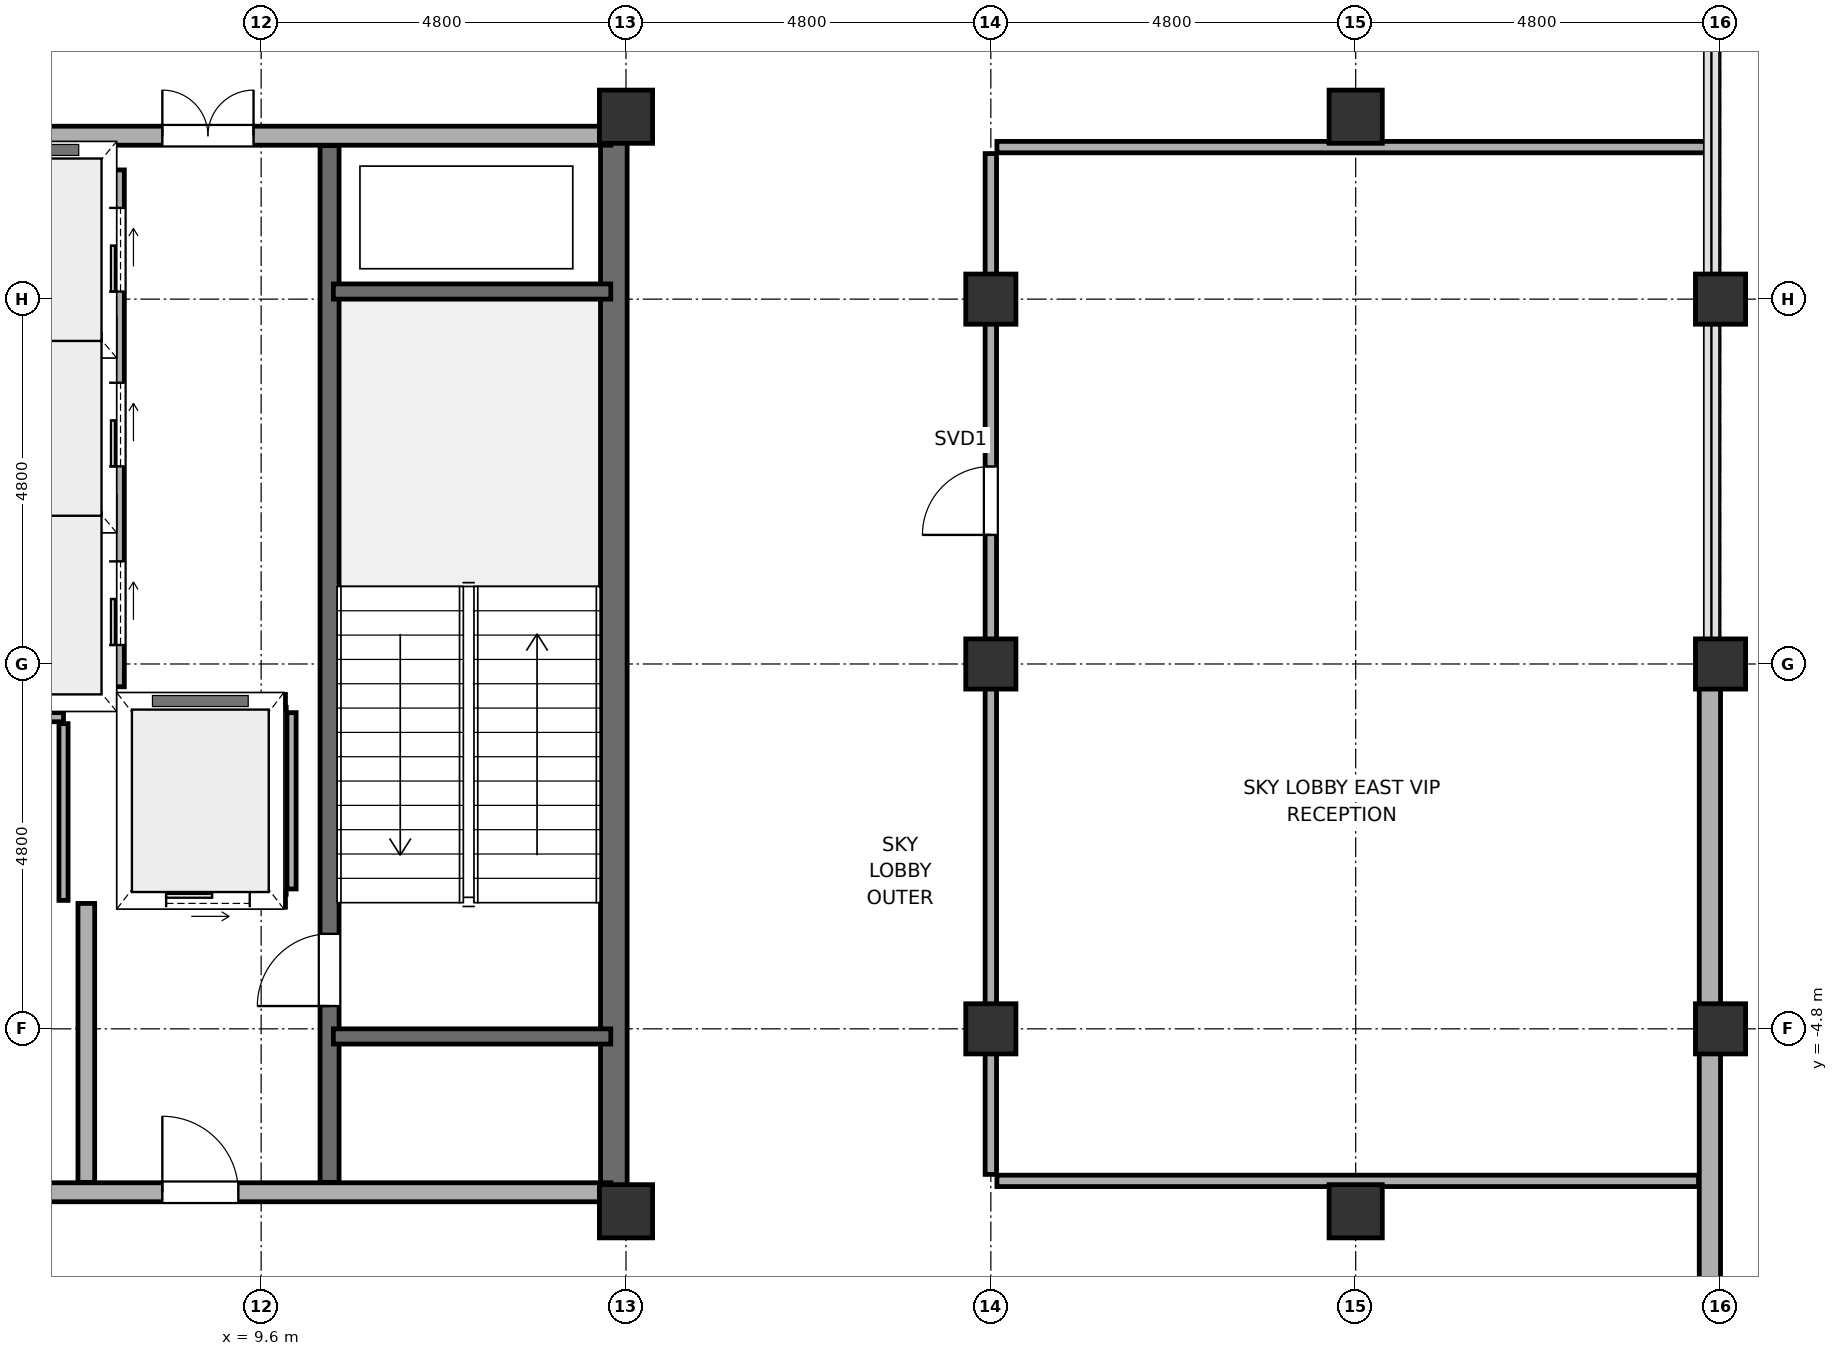
"""IFC4 building model, lengths in metres.
Left out: names, types, materials, properties, quantities, classifications, styles, units other than length and angle.
Written with IfcOpenShell. Run it as: python <this file> out.ifc"""

import sys

from ifc_helpers import new_model, si_unit, direction, frame, frame_2d, origin, origin_2d, place, context, subcontext, project, spatial, rectangle, hollow_rectangle, hollow_circle, extrude, element, fill, save


model = new_model("IFC4")
c1 = context("Model", 3, precision=1e-05, world=origin(), true_north=direction((0.0, 1.0)))
c2 = subcontext(c1, "Body", "Model", "MODEL_VIEW")
j1 = project(units=[si_unit("LENGTHUNIT", "METRE"), si_unit("PLANEANGLEUNIT", "RADIAN")], contexts=[c1])
p1 = place(None, origin())
s1 = spatial("IfcSite", under=j1, at=p1, CompositionType="ELEMENT")
p2 = place(p1, origin())
s2 = spatial("IfcBuilding", under=s1, at=p2, CompositionType="ELEMENT")
p3 = place(p2, frame((0.0, 0.0, 180.3)))
s3 = spatial("IfcBuildingStorey", under=s2, at=p3, CompositionType="ELEMENT", Elevation=180.3)
for number, where, z_axis, x_axis in (
    (1, (14.4, -7.2, 0.0), (0.0, 0.0, 1.0), (1.0, 0.0, 0.0)),
    (2, (14.4, 7.2, 0.0), (0.0, 0.0, 1.0), (1.0, 0.0, 0.0)),
):
    element("IfcColumn", number, at=place(p3, frame(where, z_axis=z_axis, x_axis=x_axis)), inside=s3, PredefinedType="COLUMN", context=c2, shape_type="SweptSolid", body=[
        extrude(hollow_rectangle(XDim=0.7, YDim=0.7, WallThickness=0.032, at=origin_2d()), origin(), (0.0, 0.0, 1.0), 5.2),
    ])
for number, where, z_axis, x_axis in (
    (3, (19.2, -4.8, 0.0), (0.0, 0.0, 1.0), (1.0, 0.0, 0.0)),
    (4, (19.2, 0.0, 0.0), (0.0, 0.0, 1.0), (1.0, 0.0, 0.0)),
    (5, (19.2, 4.8, 0.0), (0.0, 0.0, 1.0), (1.0, 0.0, 0.0)),
):
    element("IfcColumn", number, at=place(p3, frame(where, z_axis=z_axis, x_axis=x_axis)), inside=s3, PredefinedType="COLUMN", context=c2, shape_type="SweptSolid", body=[
        extrude(hollow_circle(Radius=0.33, WallThickness=0.028, at=origin_2d()), origin(), (0.0, 0.0, 1.0), 5.2),
    ])
for number, where, z_axis, x_axis in (
    (6, (24.0, -7.2, 0.0), (0.0, 0.0, 1.0), (1.0, 0.0, 0.0)),
    (7, (24.0, 7.2, 0.0), (0.0, 0.0, 1.0), (1.0, 0.0, 0.0)),
):
    element("IfcColumn", number, at=place(p3, frame(where, z_axis=z_axis, x_axis=x_axis)), inside=s3, PredefinedType="COLUMN", context=c2, shape_type="SweptSolid", body=[
        extrude(hollow_rectangle(XDim=0.7, YDim=0.7, WallThickness=0.032, at=origin_2d()), origin(), (0.0, 0.0, 1.0), 5.2),
    ])
for number, where, z_axis, x_axis in (
    (8, (28.8, -4.8, 0.0), (0.0, 0.0, 1.0), (1.0, 0.0, 0.0)),
    (9, (28.8, 0.0, 0.0), (0.0, 0.0, 1.0), (1.0, 0.0, 0.0)),
    (10, (28.8, 4.8, 0.0), (0.0, 0.0, 1.0), (1.0, 0.0, 0.0)),
):
    element("IfcColumn", number, at=place(p3, frame(where, z_axis=z_axis, x_axis=x_axis)), inside=s3, PredefinedType="COLUMN", context=c2, shape_type="SweptSolid", body=[
        extrude(hollow_circle(Radius=0.33, WallThickness=0.028, at=origin_2d()), origin(), (0.0, 0.0, 1.0), 5.2),
    ])
p4 = place(p3, frame((14.24, -7.2, -0.22), z_axis=(0.0, 0.0, 1.0), x_axis=(0.0, 1.0, 0.0)))
e11 = element("IfcWall", 11, at=p4, inside=s3, PredefinedType="SHEAR", context=c2, shape_type="SweptSolid", body=[
    extrude(rectangle(XDim=14.4, YDim=0.35, at=frame_2d((7.2, 0.0))), origin(), (0.0, 0.0, 1.0), 5.17),
])
p5 = place(p3, frame((28.66, -20.4, 0.0), z_axis=(0.0, 0.0, 1.0), x_axis=(0.0, 1.0, 0.0)))
e12 = element("IfcWall", 12, at=p5, inside=s3, PredefinedType="SOLIDWALL", context=c2, shape_type="SweptSolid", body=[
    extrude(rectangle(XDim=20.38, YDim=0.28, at=frame_2d((10.19, 0.0))), origin(), (0.0, 0.0, 1.0), 3.55),
])
p6 = place(p3, frame((4.8, -6.95, 0.0), z_axis=(0.0, 0.0, 1.0), x_axis=(1.0, 0.0, 0.0)))
e13 = element("IfcWall", 13, at=p6, inside=s3, PredefinedType="SOLIDWALL", context=c2, shape_type="SweptSolid", body=[
    extrude(rectangle(XDim=9.4, YDim=0.25, at=frame_2d((4.7, 0.0))), origin(), (0.0, 0.0, 1.0), 3.55),
])
p7 = place(p6, frame((3.5, 0.0, 0.0)))
e14 = element("IfcOpeningElement", 14, at=p7, cuts=e13, PredefinedType="OPENING", context=c2, shape_type="SweptSolid", body=[
    extrude(rectangle(XDim=1.0, YDim=2.15, at=frame_2d((0.5, 1.075))), frame((0.0, 0.14, 0.0), z_axis=(0.0, -1.0, 0.0), x_axis=(1.0, 0.0, 0.0)), (0.0, 0.0, 1.0), 0.28),
])
p8 = place(p6, frame((0.95, 0.0, 0.0)))
e15 = element("IfcOpeningElement", 15, at=p8, cuts=e13, PredefinedType="OPENING", context=c2, shape_type="SweptSolid", body=[
    extrude(rectangle(XDim=0.9, YDim=2.1, at=frame_2d((0.45, 1.05))), frame((0.0, 0.14, 0.0), z_axis=(0.0, -1.0, 0.0), x_axis=(1.0, 0.0, 0.0)), (0.0, 0.0, 1.0), 0.28),
])
p9 = place(p3, frame((4.8, 6.95, 0.0), z_axis=(0.0, 0.0, 1.0), x_axis=(1.0, 0.0, 0.0)))
e16 = element("IfcWall", 16, at=p9, inside=s3, PredefinedType="SOLIDWALL", context=c2, shape_type="SweptSolid", body=[
    extrude(rectangle(XDim=9.4, YDim=0.25, at=frame_2d((4.7, 0.0))), origin(), (0.0, 0.0, 1.0), 3.55),
])
p10 = place(p9, frame((3.5, 0.0, 0.0)))
e17 = element("IfcOpeningElement", 17, at=p10, cuts=e16, PredefinedType="OPENING", context=c2, shape_type="SweptSolid", body=[
    extrude(rectangle(XDim=1.2, YDim=2.2, at=frame_2d((0.6, 1.1))), frame((0.0, 0.14, 0.0), z_axis=(0.0, -1.0, 0.0), x_axis=(1.0, 0.0, 0.0)), (0.0, 0.0, 1.0), 0.28),
])
p11 = place(p3, frame((7.3, -6.82, 0.0), z_axis=(0.0, 0.0, 1.0), x_axis=(0.0, 1.0, 0.0)))
e18 = element("IfcWall", 18, at=p11, inside=s3, PredefinedType="SOLIDWALL", context=c2, shape_type="SweptSolid", body=[
    extrude(rectangle(XDim=3.67, YDim=0.22, at=frame_2d((1.835, 0.0))), origin(), (0.0, 0.0, 1.0), 3.55),
])
p12 = place(p3, frame((10.5, -6.82, -0.22), z_axis=(0.0, 0.0, 1.0), x_axis=(0.0, 1.0, 0.0)))
e19 = element("IfcWall", 19, at=p12, inside=s3, PredefinedType="SOLIDWALL", context=c2, shape_type="SweptSolid", body=[
    extrude(rectangle(XDim=13.64, YDim=0.25, at=frame_2d((6.82, 0.0))), origin(), (0.0, 0.0, 1.0), 5.17),
])
p13 = place(p12, frame((2.32, 0.0, 0.22)))
e20 = element("IfcOpeningElement", 20, at=p13, cuts=e19, PredefinedType="OPENING", context=c2, shape_type="SweptSolid", body=[
    extrude(rectangle(XDim=0.95, YDim=2.15, at=frame_2d((0.475, 1.075))), frame((0.0, 0.14, 0.0), z_axis=(0.0, -1.0, 0.0), x_axis=(1.0, 0.0, 0.0)), (0.0, 0.0, 1.0), 0.28),
])
for number, where, z_axis, x_axis in (
    (21, (10.55, -4.9, -0.22), (0.0, 0.0, 1.0), (1.0, 0.0, 0.0)),
    (22, (10.55, 4.9, -0.22), (0.0, 0.0, 1.0), (1.0, 0.0, 0.0)),
):
    element("IfcWall", number, at=place(p3, frame(where, z_axis=z_axis, x_axis=x_axis)), inside=s3, PredefinedType="SOLIDWALL", context=c2, shape_type="SweptSolid", body=[
        extrude(rectangle(XDim=3.65, YDim=0.2, at=frame_2d((1.825, 0.0))), origin(), (0.0, 0.0, 1.0), 5.17),
    ])
p14 = place(p3, frame((7.7, -0.3, 0.0), z_axis=(0.0, 0.0, 1.0), x_axis=(0.0, 1.0, 0.0)))
e23 = element("IfcWall", 23, at=p14, inside=s3, PredefinedType="SOLIDWALL", context=c2, shape_type="SweptSolid", body=[
    extrude(rectangle(XDim=6.8, YDim=0.2, at=frame_2d((3.4, 0.0))), origin(), (0.0, 0.0, 1.0), 4.95),
])
p15 = place(p14, frame((0.55, 0.0, 0.0)))
e24 = element("IfcOpeningElement", 24, at=p15, cuts=e23, PredefinedType="OPENING", context=c2, shape_type="SweptSolid", body=[
    extrude(rectangle(XDim=1.1, YDim=2.2, at=frame_2d((0.55, 1.1))), frame((0.0, 0.115, 0.0), z_axis=(0.0, -1.0, 0.0), x_axis=(1.0, 0.0, 0.0)), (0.0, 0.0, 1.0), 0.23),
])
p16 = place(p14, frame((2.9, 0.0, 0.0)))
e25 = element("IfcOpeningElement", 25, at=p16, cuts=e23, PredefinedType="OPENING", context=c2, shape_type="SweptSolid", body=[
    extrude(rectangle(XDim=1.1, YDim=2.2, at=frame_2d((0.55, 1.1))), frame((0.0, 0.115, 0.0), z_axis=(0.0, -1.0, 0.0), x_axis=(1.0, 0.0, 0.0)), (0.0, 0.0, 1.0), 0.23),
])
p17 = place(p14, frame((5.2, 0.0, 0.0)))
e26 = element("IfcOpeningElement", 26, at=p17, cuts=e23, PredefinedType="OPENING", context=c2, shape_type="SweptSolid", body=[
    extrude(rectangle(XDim=1.1, YDim=2.2, at=frame_2d((0.55, 1.1))), frame((0.0, 0.115, 0.0), z_axis=(0.0, -1.0, 0.0), x_axis=(1.0, 0.0, 0.0)), (0.0, 0.0, 1.0), 0.23),
])
for number, where, z_axis, x_axis in (
    (27, (5.44, -0.3, 0.0), (0.0, 0.0, 1.0), (1.0, 0.0, 0.0)),
    (28, (5.44, 1.975, 0.0), (0.0, 0.0, 1.0), (1.0, 0.0, 0.0)),
    (29, (5.44, 4.325, 0.0), (0.0, 0.0, 1.0), (1.0, 0.0, 0.0)),
    (30, (5.44, 6.5, 0.0), (0.0, 0.0, 1.0), (1.0, 0.0, 0.0)),
):
    element("IfcWall", number, at=place(p3, frame(where, z_axis=z_axis, x_axis=x_axis)), inside=s3, PredefinedType="PARTITIONING", context=c2, shape_type="SweptSolid", body=[
        extrude(rectangle(XDim=2.12, YDim=0.12, at=frame_2d((1.06, 0.0))), origin(), (0.0, 0.0, 1.0), 4.95),
    ])
p18 = place(p3, frame((7.88, -3.1, 0.0), z_axis=(0.0, 0.0, 1.0), x_axis=(1.0, 0.0, 0.0)))
e31 = element("IfcWall", 31, at=p18, inside=s3, PredefinedType="SOLIDWALL", context=c2, shape_type="SweptSolid", body=[
    extrude(rectangle(XDim=2.04, YDim=0.2, at=frame_2d((1.02, 0.0))), origin(), (0.0, 0.0, 1.0), 4.95),
])
p19 = place(p18, frame((0.47, 0.0, 0.0)))
e32 = element("IfcOpeningElement", 32, at=p19, cuts=e31, PredefinedType="OPENING", context=c2, shape_type="SweptSolid", body=[
    extrude(rectangle(XDim=1.1, YDim=2.2, at=frame_2d((0.55, 1.1))), frame((0.0, 0.115, 0.0), z_axis=(0.0, -1.0, 0.0), x_axis=(1.0, 0.0, 0.0)), (0.0, 0.0, 1.0), 0.23),
])
p20 = place(p3, frame((7.88, -0.5, 0.0), z_axis=(0.0, 0.0, 1.0), x_axis=(1.0, 0.0, 0.0)))
e33 = element("IfcWall", 33, at=p20, inside=s3, PredefinedType="SOLIDWALL", context=c2, shape_type="SweptSolid", body=[
    extrude(rectangle(XDim=2.04, YDim=0.2, at=frame_2d((1.02, 0.0))), origin(), (0.0, 0.0, 1.0), 4.95),
])
for number, where, z_axis, x_axis in (
    (34, (7.8, -2.96, 0.0), (0.0, 0.0, 1.0), (0.0, 1.0, 0.0)),
    (35, (10.0, -2.96, 0.0), (0.0, 0.0, 1.0), (0.0, 1.0, 0.0)),
):
    element("IfcWall", number, at=place(p3, frame(where, z_axis=z_axis, x_axis=x_axis)), inside=s3, PredefinedType="PARTITIONING", context=c2, shape_type="SweptSolid", body=[
        extrude(rectangle(XDim=2.32, YDim=0.12, at=frame_2d((1.16, 0.0))), origin(), (0.0, 0.0, 1.0), 4.95),
    ])
p21 = place(p3, frame((19.28, -6.8, 0.0), z_axis=(0.0, 0.0, 1.0), x_axis=(1.0, 0.0, 0.0)))
e36 = element("IfcWall", 36, at=p21, inside=s3, PredefinedType="PARTITIONING", context=c2, shape_type="SweptSolid", body=[
    extrude(rectangle(XDim=9.23, YDim=0.15, at=frame_2d((4.615, 0.0))), origin(), (0.0, 0.0, 1.0), 3.55),
])
p22 = place(p3, frame((5.35, -0.7, 0.0), z_axis=(0.0, 0.0, 1.0), x_axis=(1.0, 0.0, 0.0)))
e37 = element("IfcWall", 37, at=p22, inside=s3, PredefinedType="PARTITIONING", context=c2, shape_type="SweptSolid", body=[
    extrude(rectangle(XDim=1.65, YDim=0.12, at=frame_2d((0.825, 0.0))), origin(), (0.0, 0.0, 1.0), 4.95),
])
p23 = place(p3, frame((19.28, 6.8, 0.0), z_axis=(0.0, 0.0, 1.0), x_axis=(1.0, 0.0, 0.0)))
e38 = element("IfcWall", 38, at=p23, inside=s3, PredefinedType="PARTITIONING", context=c2, shape_type="SweptSolid", body=[
    extrude(rectangle(XDim=9.35, YDim=0.15, at=frame_2d((4.675, 0.0))), origin(), (0.0, 0.0, 1.0), 3.55),
])
p24 = place(p3, frame((7.0, -3.11, 0.0), z_axis=(0.0, 0.0, 1.0), x_axis=(0.0, 1.0, 0.0)))
e39 = element("IfcWall", 39, at=p24, inside=s3, PredefinedType="PARTITIONING", context=c2, shape_type="SweptSolid", body=[
    extrude(rectangle(XDim=2.325, YDim=0.12, at=frame_2d((1.163, 0.0))), origin(), (0.0, 0.0, 1.0), 4.95),
])
p25 = place(p3, frame((19.2, -6.715, 0.0), z_axis=(0.0, 0.0, 1.0), x_axis=(0.0, 1.0, 0.0)))
e40 = element("IfcWall", 40, at=p25, inside=s3, PredefinedType="PARTITIONING", context=c2, shape_type="SweptSolid", body=[
    extrude(rectangle(XDim=13.43, YDim=0.15, at=frame_2d((6.715, 0.0))), origin(), (0.0, 0.0, 1.0), 3.55),
])
p26 = place(p25, frame((8.413, 0.0, 0.0)))
e41 = element("IfcOpeningElement", 41, at=p26, cuts=e40, PredefinedType="OPENING", context=c2, shape_type="SweptSolid", body=[
    extrude(rectangle(XDim=0.9, YDim=2.1, at=frame_2d((0.45, 1.05))), frame((0.0, 0.09, 0.0), z_axis=(0.0, -1.0, 0.0), x_axis=(1.0, 0.0, 0.0)), (0.0, 0.0, 1.0), 0.18),
])
p27 = place(p7, origin())
e42 = element("IfcDoor", 42, at=p27, inside=s3, OperationType="SINGLE_SWING_LEFT", PredefinedType="DOOR", context=c2, shape_type="SweptSolid", body=[
    extrude(rectangle(XDim=1.0, YDim=2.15, at=frame_2d((0.5, 1.075))), frame((0.0, 0.025, 0.0), z_axis=(0.0, -1.0, 0.0), x_axis=(1.0, 0.0, 0.0)), (0.0, 0.0, 1.0), 0.05),
])
fill(e14, e42)
p28 = place(p10, origin())
e43 = element("IfcDoor", 43, at=p28, inside=s3, OperationType="DOUBLE_DOOR_SINGLE_SWING", PredefinedType="DOOR", context=c2, shape_type="SweptSolid", body=[
    extrude(rectangle(XDim=1.2, YDim=2.2, at=frame_2d((0.6, 1.1))), frame((0.0, 0.025, 0.0), z_axis=(0.0, -1.0, 0.0), x_axis=(1.0, 0.0, 0.0)), (0.0, 0.0, 1.0), 0.05),
])
fill(e17, e43)
p29 = place(p13, origin())
e44 = element("IfcDoor", 44, at=p29, inside=s3, OperationType="SINGLE_SWING_LEFT", PredefinedType="DOOR", context=c2, shape_type="SweptSolid", body=[
    extrude(rectangle(XDim=0.95, YDim=2.15, at=frame_2d((0.475, 1.075))), frame((0.0, 0.025, 0.0), z_axis=(0.0, -1.0, 0.0), x_axis=(1.0, 0.0, 0.0)), (0.0, 0.0, 1.0), 0.05),
])
fill(e20, e44)
p30 = place(p15, origin())
e45 = element("IfcDoor", 45, at=p30, inside=s3, OperationType="SLIDING_TO_LEFT", PredefinedType="DOOR", context=c2, shape_type="SweptSolid", body=[
    extrude(rectangle(XDim=1.1, YDim=2.2, at=frame_2d((0.55, 1.1))), frame((0.0, 0.025, 0.0), z_axis=(0.0, -1.0, 0.0), x_axis=(1.0, 0.0, 0.0)), (0.0, 0.0, 1.0), 0.05),
])
fill(e24, e45)
p31 = place(p16, origin())
e46 = element("IfcDoor", 46, at=p31, inside=s3, OperationType="SLIDING_TO_LEFT", PredefinedType="DOOR", context=c2, shape_type="SweptSolid", body=[
    extrude(rectangle(XDim=1.1, YDim=2.2, at=frame_2d((0.55, 1.1))), frame((0.0, 0.025, 0.0), z_axis=(0.0, -1.0, 0.0), x_axis=(1.0, 0.0, 0.0)), (0.0, 0.0, 1.0), 0.05),
])
fill(e25, e46)
p32 = place(p17, origin())
e47 = element("IfcDoor", 47, at=p32, inside=s3, OperationType="SLIDING_TO_LEFT", PredefinedType="DOOR", context=c2, shape_type="SweptSolid", body=[
    extrude(rectangle(XDim=1.1, YDim=2.2, at=frame_2d((0.55, 1.1))), frame((0.0, 0.025, 0.0), z_axis=(0.0, -1.0, 0.0), x_axis=(1.0, 0.0, 0.0)), (0.0, 0.0, 1.0), 0.05),
])
fill(e26, e47)
p33 = place(p19, origin())
e48 = element("IfcDoor", 48, at=p33, inside=s3, OperationType="SLIDING_TO_LEFT", PredefinedType="DOOR", context=c2, shape_type="SweptSolid", body=[
    extrude(rectangle(XDim=1.1, YDim=2.2, at=frame_2d((0.55, 1.1))), frame((0.0, 0.025, 0.0), z_axis=(0.0, -1.0, 0.0), x_axis=(1.0, 0.0, 0.0)), (0.0, 0.0, 1.0), 0.05),
])
fill(e32, e48)
p34 = place(p26, origin())
e49 = element("IfcDoor", 49, at=p34, inside=s3, OperationType="SINGLE_SWING_LEFT", PredefinedType="DOOR", context=c2, shape_type="SweptSolid", body=[
    extrude(rectangle(XDim=0.9, YDim=2.1, at=frame_2d((0.45, 1.05))), frame((0.0, 0.025, 0.0), z_axis=(0.0, -1.0, 0.0), x_axis=(1.0, 0.0, 0.0)), (0.0, 0.0, 1.0), 0.05),
])
fill(e41, e49)
save(model, sys.argv[1])
